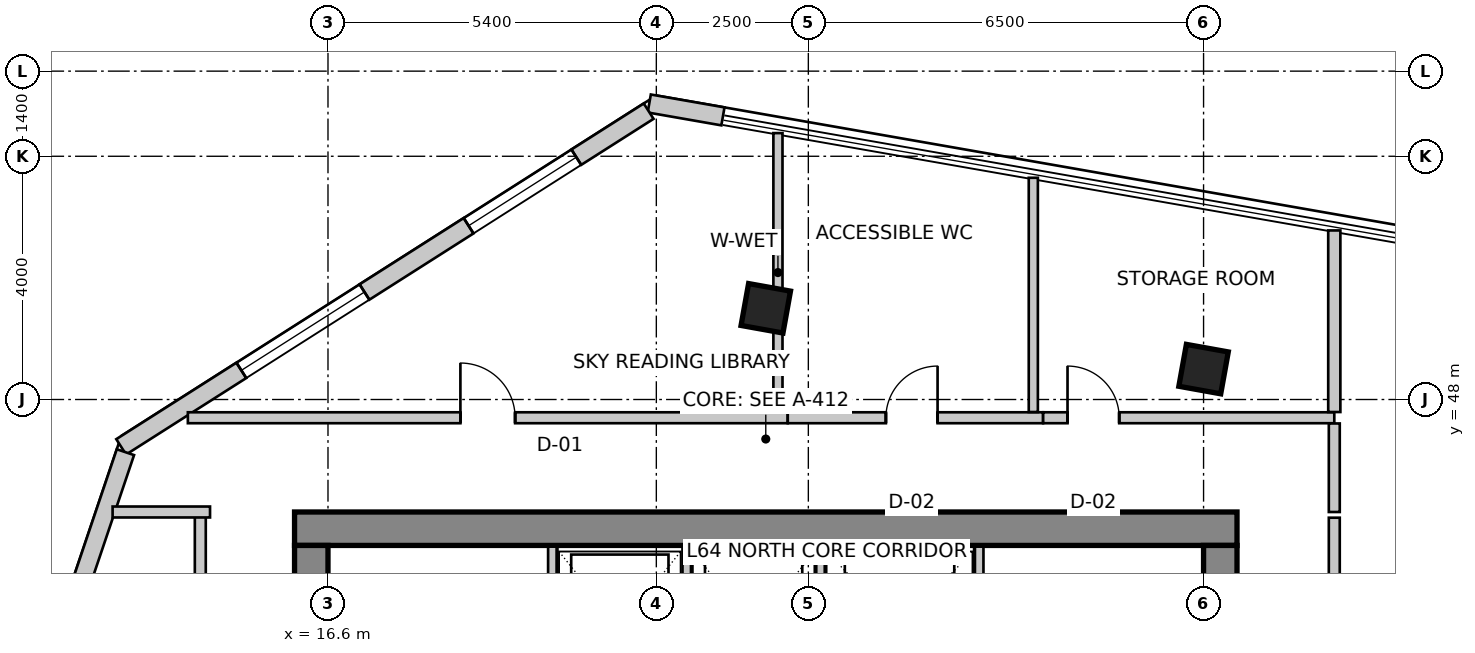
"""IFC4 building model, lengths in metres.
Left out: names, types, materials, properties, quantities, classifications, styles, units other than length and angle.
Written with IfcOpenShell. Run it as: python <this file> out.ifc"""

import sys

from ifc_helpers import new_model, si_unit, direction, frame, frame_2d, origin, origin_2d, place, context, subcontext, project, spatial, rectangle, extrude, source, transform, mapped, element, fill, save


model = new_model("IFC4")
c1 = context("Model", 3, precision=1e-05, world=origin(), true_north=direction((0.0, 1.0)))
c2 = subcontext(c1, "Body", "Model", "MODEL_VIEW")
j1 = project(units=[si_unit("LENGTHUNIT", "METRE"), si_unit("PLANEANGLEUNIT", "RADIAN")], contexts=[c1])
p1 = place(None, origin())
s1 = spatial("IfcSite", under=j1, at=p1, CompositionType="ELEMENT")
p2 = place(p1, origin())
s2 = spatial("IfcBuilding", under=s1, at=p2, CompositionType="ELEMENT")
p3 = place(p2, frame((0.0, 0.0, 252.9)))
s3 = spatial("IfcBuildingStorey", under=s2, at=p3, CompositionType="ELEMENT", Elevation=252.9)
p4 = place(p3, frame((16.05, 45.875, 0.0), z_axis=(0.0, 0.0, 1.0), x_axis=(1.0, 0.0, 0.0)))
e1 = element("IfcWall", 1, at=p4, inside=s3, PredefinedType="SHEAR", context=c2, shape_type="SweptSolid", body=[
    extrude(rectangle(XDim=15.5, YDim=0.55, at=frame_2d((7.75, 0.0))), origin(), (0.0, 0.0, 1.0), 3.6),
])
p5 = place(p3, frame((16.325, 34.2, 0.0), z_axis=(0.0, 0.0, 1.0), x_axis=(0.0, 1.0, 0.0)))
e2 = element("IfcWall", 2, at=p5, inside=s3, PredefinedType="SHEAR", context=c2, shape_type="SweptSolid", body=[
    extrude(rectangle(XDim=11.4, YDim=0.55, at=frame_2d((5.7, 0.0))), origin(), (0.0, 0.0, 1.0), 3.6),
])
m1 = source(origin(), c2, "Body", "SweptSolid", [
    extrude(rectangle(XDim=1.1, YDim=2.15, at=frame_2d((0.55, 1.075))), frame((0.0, 0.285, 0.0), z_axis=(0.0, -1.0, 0.0), x_axis=(1.0, 0.0, 0.0)), (0.0, 0.0, 1.0), 0.57),
])
p6 = place(p5, frame((7.15, 0.0, 0.0)))
e3 = element("IfcOpeningElement", 3, at=p6, cuts=e2, PredefinedType="OPENING", context=c2, shape_type="MappedRepresentation", body=[
    mapped(m1, transform((0.0, 0.0, 0.0), scale=1.0)),
])
p7 = place(p3, frame((31.275, 34.2, 0.0), z_axis=(0.0, 0.0, 1.0), x_axis=(0.0, 1.0, 0.0)))
e4 = element("IfcWall", 4, at=p7, inside=s3, PredefinedType="SHEAR", context=c2, shape_type="SweptSolid", body=[
    extrude(rectangle(XDim=11.4, YDim=0.55, at=frame_2d((5.7, 0.0))), origin(), (0.0, 0.0, 1.0), 3.6),
])
p8 = place(p7, frame((7.35, 0.0, 0.0)))
e5 = element("IfcOpeningElement", 5, at=p8, cuts=e4, PredefinedType="OPENING", context=c2, shape_type="MappedRepresentation", body=[
    mapped(m1, transform((0.0, 0.0, 0.0), scale=1.0)),
])
m2 = source(origin(), c2, "Body", "SweptSolid", [
    extrude(rectangle(XDim=0.7, YDim=0.7, at=origin_2d()), origin(), (0.0, 0.0, 1.0), 3.6),
])
for number, where, z_axis, x_axis in (
    (6, (23.8, 49.5, 0.0), (0.0, 0.0, 1.0), (0.984, -0.177, 0.0)),
    (7, (31.0, 48.5, 0.0), (0.0, 0.0, 1.0), (0.984, -0.177, 0.0)),
):
    element("IfcColumn", number, at=place(p3, frame(where, z_axis=z_axis, x_axis=x_axis)), inside=s3, PredefinedType="COLUMN", context=c2, shape_type="MappedRepresentation", body=[
        mapped(m2, transform((0.0, 0.0, 0.0), scale=1.0)),
    ])
p9 = place(p3, frame((23.095, 52.656, 0.0), z_axis=(0.0, 0.0, 1.0), x_axis=(-0.985008549623, 0.172505527937, 0.0)))
e8 = element("IfcWall", 8, at=p9, inside=s3, PredefinedType="SOLIDWALL", context=c2, shape_type="SweptSolid", body=[
    extrude(rectangle(XDim=1.23, YDim=0.3, at=frame_2d((0.615, 0.0))), origin(), (0.0, 0.0, 1.0), 3.35),
])
p10 = place(p3, frame((21.874, 52.742, 0.0), z_axis=(0.0, 0.0, 1.0), x_axis=(-0.84365659959, -0.536883173482, 0.0)))
e9 = element("IfcWall", 9, at=p10, inside=s3, PredefinedType="SOLIDWALL", context=c2, shape_type="SweptSolid", body=[
    extrude(rectangle(XDim=10.283, YDim=0.3, at=frame_2d((5.142, 0.0))), origin(), (0.0, 0.0, 1.0), 3.35),
])
m3 = source(origin(), c2, "Body", "SweptSolid", [
    extrude(rectangle(XDim=2.1, YDim=2.0, at=frame_2d((1.05, 1.0))), frame((0.0, 0.16, 0.0), z_axis=(0.0, -1.0, 0.0), x_axis=(1.0, 0.0, 0.0)), (0.0, 0.0, 1.0), 0.32),
])
p11 = place(p10, frame((1.41, 0.0, 0.85)))
e10 = element("IfcOpeningElement", 10, at=p11, cuts=e9, PredefinedType="OPENING", context=c2, shape_type="MappedRepresentation", body=[
    mapped(m3, transform((0.0, 0.0, 0.0), scale=1.0)),
])
m4 = source(origin(), c2, "Body", "SweptSolid", [
    extrude(rectangle(XDim=2.4, YDim=2.2, at=frame_2d((1.2, 1.1))), frame((0.0, 0.16, 0.0), z_axis=(0.0, -1.0, 0.0), x_axis=(1.0, 0.0, 0.0)), (0.0, 0.0, 1.0), 0.32),
])
p12 = place(p10, frame((5.54, 0.0, 0.85)))
e11 = element("IfcOpeningElement", 11, at=p12, cuts=e9, PredefinedType="OPENING", context=c2, shape_type="MappedRepresentation", body=[
    mapped(m4, transform((0.0, 0.0, 0.0), scale=1.0)),
])
p13 = place(p3, frame((13.269, 47.134, 0.0), z_axis=(0.0, 0.0, 1.0), x_axis=(-0.3199211297, -0.947444178182, 0.0)))
e12 = element("IfcWall", 12, at=p13, inside=s3, PredefinedType="SOLIDWALL", context=c2, shape_type="SweptSolid", body=[
    extrude(rectangle(XDim=16.132, YDim=0.3, at=frame_2d((8.066, 0.0))), origin(), (0.0, 0.0, 1.0), 3.35),
])
p14 = place(p13, frame((2.435, 0.0, 0.85)))
e13 = element("IfcOpeningElement", 13, at=p14, cuts=e12, PredefinedType="OPENING", context=c2, shape_type="MappedRepresentation", body=[
    mapped(m4, transform((0.0, 0.0, 0.0), scale=1.0)),
])
p15 = place(p13, frame((7.417, 0.0, 0.85)))
e14 = element("IfcOpeningElement", 14, at=p15, cuts=e12, PredefinedType="OPENING", context=c2, shape_type="MappedRepresentation", body=[
    mapped(m3, transform((0.0, 0.0, 0.0), scale=1.0)),
])
p16 = place(p13, frame((12.099, 0.0, 0.85)))
e15 = element("IfcOpeningElement", 15, at=p16, cuts=e12, PredefinedType="OPENING", context=c2, shape_type="MappedRepresentation", body=[
    mapped(m4, transform((0.0, 0.0, 0.0), scale=1.0)),
])
for number, where, z_axis, x_axis in (
    (16, (20.29, 43.28, 0.0), (0.0, 0.0, 1.0), (0.0, 1.0, 0.0)),
    (17, (27.31, 43.28, 0.0), (0.0, 0.0, 1.0), (0.0, 1.0, 0.0)),
):
    element("IfcWall", number, at=place(p3, frame(where, z_axis=z_axis, x_axis=x_axis)), inside=s3, PredefinedType="SOLIDWALL", context=c2, shape_type="SweptSolid", body=[
        extrude(rectangle(XDim=2.3, YDim=0.14, at=frame_2d((1.15, 0.0))), origin(), (0.0, 0.0, 1.0), 3.35),
    ])
for number, where, z_axis, x_axis in (
    (18, (22.5, 43.02, 0.0), (0.0, 0.0, 1.0), (0.0, 1.0, 0.0)),
    (19, (24.7, 43.02, 0.0), (0.0, 0.0, 1.0), (0.0, 1.0, 0.0)),
):
    element("IfcWall", number, at=place(p3, frame(where, z_axis=z_axis, x_axis=x_axis)), inside=s3, PredefinedType="SOLIDWALL", context=c2, shape_type="SweptSolid", body=[
        extrude(rectangle(XDim=2.56, YDim=0.14, at=frame_2d((1.28, 0.0))), origin(), (0.0, 0.0, 1.0), 3.35),
    ])
p17 = place(p3, frame((14.5, 33.744, 0.0), z_axis=(0.0, 0.0, 1.0), x_axis=(0.0, 1.0, 0.0)))
e20 = element("IfcWall", 20, at=p17, inside=s3, PredefinedType="PARTITIONING", context=c2, shape_type="SweptSolid", body=[
    extrude(rectangle(XDim=12.406, YDim=0.18, at=frame_2d((6.203, 0.0))), origin(), (0.0, 0.0, 1.0), 3.35),
])
m5 = source(origin(), c2, "Body", "SweptSolid", [
    extrude(rectangle(XDim=0.9, YDim=2.15, at=frame_2d((0.45, 1.075))), frame((0.0, 0.1, 0.0), z_axis=(0.0, -1.0, 0.0), x_axis=(1.0, 0.0, 0.0)), (0.0, 0.0, 1.0), 0.2),
])
p18 = place(p17, frame((4.37, 0.0, 0.0)))
e21 = element("IfcOpeningElement", 21, at=p18, cuts=e20, PredefinedType="OPENING", context=c2, shape_type="MappedRepresentation", body=[
    mapped(m5, transform((0.0, 0.0, 0.0), scale=1.0)),
])
p19 = place(p3, frame((14.66, 46.15, 0.0), z_axis=(0.0, 0.0, 1.0), x_axis=(-1.0, 0.0, 0.0)))
e22 = element("IfcWall", 22, at=p19, inside=s3, PredefinedType="PARTITIONING", context=c2, shape_type="SweptSolid", body=[
    extrude(rectangle(XDim=1.602, YDim=0.18, at=frame_2d((0.801, 0.0))), origin(), (0.0, 0.0, 1.0), 3.35),
])
p20 = place(p3, frame((14.295, 47.7, 0.0), z_axis=(0.0, 0.0, 1.0), x_axis=(1.0, 0.0, 0.0)))
e23 = element("IfcWall", 23, at=p20, inside=s3, PredefinedType="PARTITIONING", context=c2, shape_type="SweptSolid", body=[
    extrude(rectangle(XDim=9.865, YDim=0.18, at=frame_2d((4.932, 0.0))), origin(), (0.0, 0.0, 1.0), 3.019),
])
p21 = place(p20, frame((4.482, 0.0, 0.0)))
e24 = element("IfcOpeningElement", 24, at=p21, cuts=e23, PredefinedType="OPENING", context=c2, shape_type="MappedRepresentation", body=[
    mapped(m5, transform((0.0, 0.0, 0.0), scale=1.0)),
])
p22 = place(p3, frame((24.162, 47.7, 0.0), z_axis=(0.0, 0.0, 1.0), x_axis=(1.0, 0.0, 0.0)))
e25 = element("IfcWall", 25, at=p22, inside=s3, PredefinedType="PARTITIONING", context=c2, shape_type="SweptSolid", body=[
    extrude(rectangle(XDim=4.198, YDim=0.18, at=frame_2d((2.099, 0.0))), origin(), (0.0, 0.0, 1.0), 3.35),
])
m6 = source(origin(), c2, "Body", "SweptSolid", [
    extrude(rectangle(XDim=0.85, YDim=2.15, at=frame_2d((0.425, 1.075))), frame((0.0, 0.1, 0.0), z_axis=(0.0, -1.0, 0.0), x_axis=(1.0, 0.0, 0.0)), (0.0, 0.0, 1.0), 0.2),
])
p23 = place(p22, frame((1.613, 0.0, 0.0)))
e26 = element("IfcOpeningElement", 26, at=p23, cuts=e25, PredefinedType="OPENING", context=c2, shape_type="MappedRepresentation", body=[
    mapped(m6, transform((0.0, 0.0, 0.0), scale=1.0)),
])
p24 = place(p3, frame((28.362, 47.7, 0.0), z_axis=(0.0, 0.0, 1.0), x_axis=(1.0, 0.0, 0.0)))
e27 = element("IfcWall", 27, at=p24, inside=s3, PredefinedType="PARTITIONING", context=c2, shape_type="SweptSolid", body=[
    extrude(rectangle(XDim=4.788, YDim=0.18, at=frame_2d((2.394, 0.0))), origin(), (0.0, 0.0, 1.0), 2.879),
])
p25 = place(p24, frame((0.401, 0.0, 0.0)))
e28 = element("IfcOpeningElement", 28, at=p25, cuts=e27, PredefinedType="OPENING", context=c2, shape_type="MappedRepresentation", body=[
    mapped(m6, transform((0.0, 0.0, 0.0), scale=1.0)),
])
p26 = place(p3, frame((33.15, 47.606, 0.0), z_axis=(0.0, 0.0, 1.0), x_axis=(0.0, -1.0, 0.0)))
e29 = element("IfcWall", 29, at=p26, inside=s3, PredefinedType="PARTITIONING", context=c2, shape_type="SweptSolid", body=[
    extrude(rectangle(XDim=1.456, YDim=0.18, at=frame_2d((0.728, 0.0))), origin(), (0.0, 0.0, 1.0), 3.35),
])
p27 = place(p3, frame((33.15, 46.056, 0.0), z_axis=(0.0, 0.0, 1.0), x_axis=(0.0, -1.0, 0.0)))
e30 = element("IfcWall", 30, at=p27, inside=s3, PredefinedType="PARTITIONING", context=c2, shape_type="SweptSolid", body=[
    extrude(rectangle(XDim=4.636, YDim=0.18, at=frame_2d((2.318, 0.0))), origin(), (0.0, 0.0, 1.0), 2.879),
])
p28 = place(p27, frame((1.868, 0.0, 0.0)))
e31 = element("IfcOpeningElement", 31, at=p28, cuts=e30, PredefinedType="OPENING", context=c2, shape_type="MappedRepresentation", body=[
    mapped(m5, transform((0.0, 0.0, 0.0), scale=1.0)),
])
p29 = place(p3, frame((24.0, 52.381, 0.0), z_axis=(0.0, 0.0, 1.0), x_axis=(0.0, -1.0, 0.0)))
e32 = element("IfcWall", 32, at=p29, inside=s3, PredefinedType="PARTITIONING", context=c2, shape_type="SweptSolid", body=[
    extrude(rectangle(XDim=4.587, YDim=0.15, at=frame_2d((2.293, 0.0))), origin(), (0.0, 0.0, 1.0), 2.642),
])
p30 = place(p3, frame((28.2, 51.646, 0.0), z_axis=(0.0, 0.0, 1.0), x_axis=(0.0, -1.0, 0.0)))
e33 = element("IfcWall", 33, at=p30, inside=s3, PredefinedType="PARTITIONING", context=c2, shape_type="SweptSolid", body=[
    extrude(rectangle(XDim=3.852, YDim=0.15, at=frame_2d((1.926, 0.0))), origin(), (0.0, 0.0, 1.0), 2.642),
])
p31 = place(p3, frame((33.15, 50.78, 0.0), z_axis=(0.0, 0.0, 1.0), x_axis=(0.0, -1.0, 0.0)))
e34 = element("IfcWall", 34, at=p31, inside=s3, PredefinedType="PARTITIONING", context=c2, shape_type="SweptSolid", body=[
    extrude(rectangle(XDim=2.986, YDim=0.2, at=frame_2d((1.493, 0.0))), origin(), (0.0, 0.0, 1.0), 2.642),
])
m7 = source(origin(), c2, "Body", "SweptSolid", [
    extrude(rectangle(XDim=2.1, YDim=2.0, at=frame_2d((1.05, 1.0))), frame((0.0, -0.015, 0.0), z_axis=(0.0, -1.0, 0.0), x_axis=(1.0, 0.0, 0.0)), (0.0, 0.0, 1.0), 0.06),
])
p32 = place(p11, origin())
e35 = element("IfcWindow", 35, at=p32, inside=s3, PartitioningType="SINGLE_PANEL", PredefinedType="WINDOW", context=c2, shape_type="MappedRepresentation", body=[
    mapped(m7, transform((0.0, 0.0, 0.0), scale=1.0)),
])
fill(e10, e35)
m8 = source(origin(), c2, "Body", "SweptSolid", [
    extrude(rectangle(XDim=2.4, YDim=2.2, at=frame_2d((1.2, 1.1))), frame((0.0, -0.015, 0.0), z_axis=(0.0, -1.0, 0.0), x_axis=(1.0, 0.0, 0.0)), (0.0, 0.0, 1.0), 0.06),
])
p33 = place(p12, origin())
e36 = element("IfcWindow", 36, at=p33, inside=s3, PartitioningType="SINGLE_PANEL", PredefinedType="WINDOW", context=c2, shape_type="MappedRepresentation", body=[
    mapped(m8, transform((0.0, 0.0, 0.0), scale=1.0)),
])
fill(e11, e36)
m9 = source(origin(), c2, "Body", "SweptSolid", [
    extrude(rectangle(XDim=0.9, YDim=2.15, at=frame_2d((0.45, 1.075))), frame((0.0, 0.025, 0.0), z_axis=(0.0, -1.0, 0.0), x_axis=(1.0, 0.0, 0.0)), (0.0, 0.0, 1.0), 0.05),
])
p34 = place(p21, origin())
e37 = element("IfcDoor", 37, at=p34, inside=s3, OperationType="SINGLE_SWING_LEFT", PredefinedType="DOOR", context=c2, shape_type="MappedRepresentation", body=[
    mapped(m9, transform((0.0, 0.0, 0.0), scale=1.0)),
])
fill(e24, e37)
m10 = source(origin(), c2, "Body", "SweptSolid", [
    extrude(rectangle(XDim=0.85, YDim=2.15, at=frame_2d((0.425, 1.075))), frame((0.0, 0.025, 0.0), z_axis=(0.0, -1.0, 0.0), x_axis=(1.0, 0.0, 0.0)), (0.0, 0.0, 1.0), 0.05),
])
p35 = place(p23, origin())
e38 = element("IfcDoor", 38, at=p35, inside=s3, OperationType="SINGLE_SWING_RIGHT", PredefinedType="DOOR", context=c2, shape_type="MappedRepresentation", body=[
    mapped(m10, transform((0.0, 0.0, 0.0), scale=1.0)),
])
fill(e26, e38)
p36 = place(p25, origin())
e39 = element("IfcDoor", 39, at=p36, inside=s3, OperationType="SINGLE_SWING_LEFT", PredefinedType="DOOR", context=c2, shape_type="MappedRepresentation", body=[
    mapped(m10, transform((0.0, 0.0, 0.0), scale=1.0)),
])
fill(e28, e39)
save(model, sys.argv[1])
